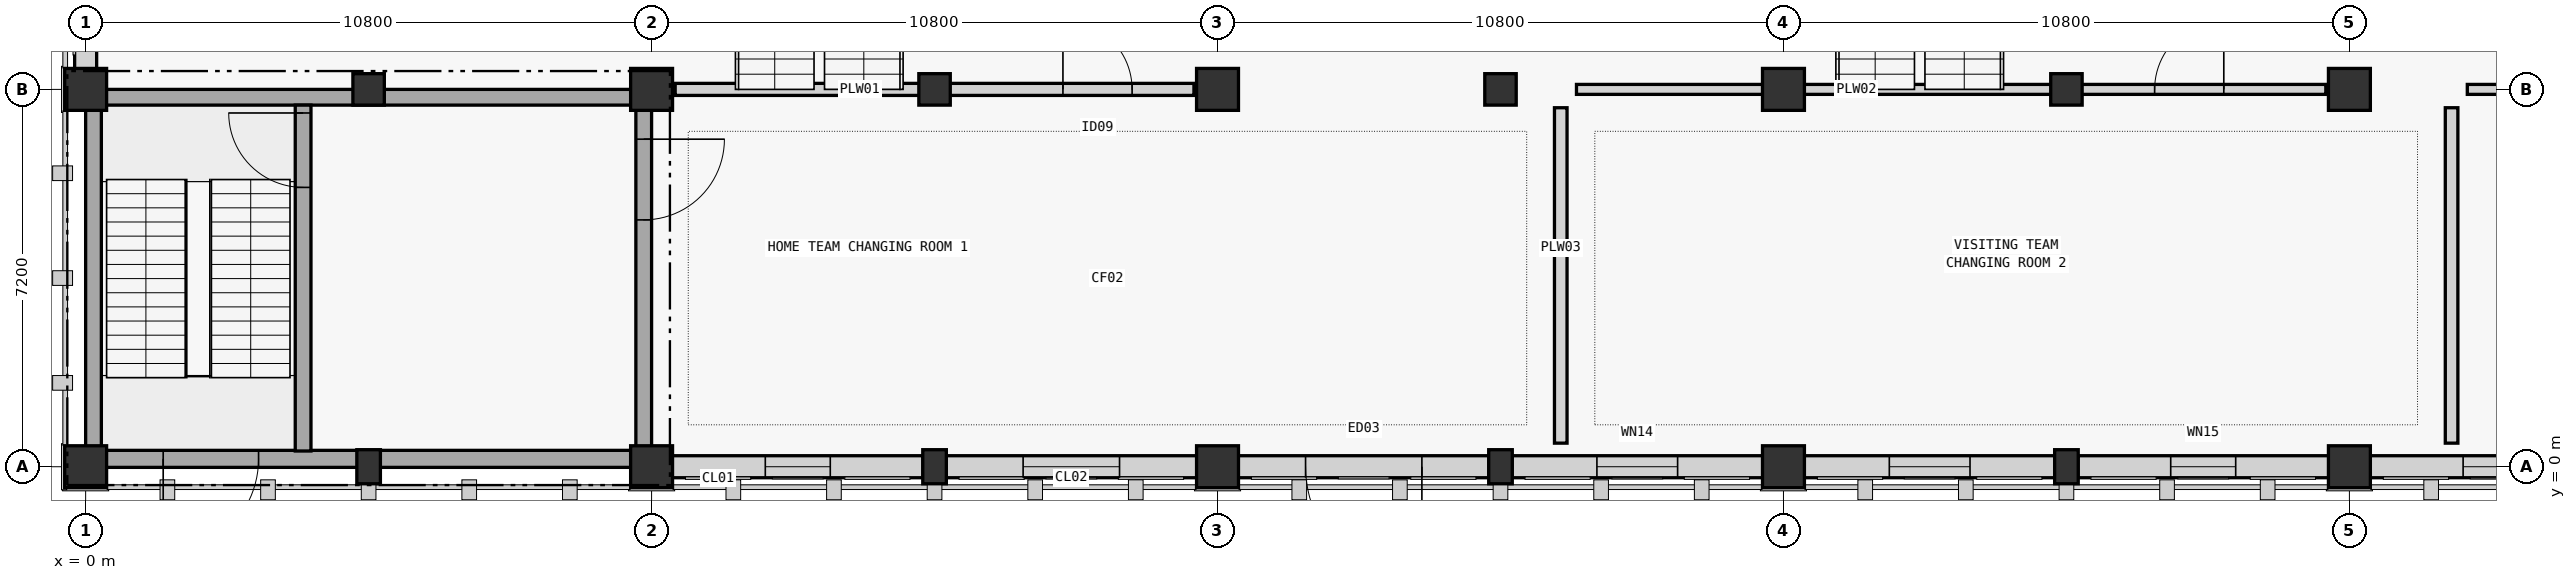
"""IFC4 building model, lengths in metres.
Left out: names, types, materials, properties, quantities, classifications, styles, units other than length and angle.
Written with IfcOpenShell. Run it as: python <this file> out.ifc"""

import sys

from ifc_helpers import new_model, si_unit, direction, frame, frame_2d, origin, origin_2d, place, context, subcontext, project, spatial, rectangle, extrude, element, fill, save


model = new_model("IFC4")
c1 = context("Model", 3, precision=1e-05, world=origin(), true_north=direction((0.0, 1.0)))
c2 = subcontext(c1, "Body", "Model", "MODEL_VIEW")
j1 = project(units=[si_unit("LENGTHUNIT", "METRE"), si_unit("PLANEANGLEUNIT", "RADIAN")], contexts=[c1])
p1 = place(None, origin())
s1 = spatial("IfcSite", under=j1, at=p1, CompositionType="ELEMENT")
p2 = place(p1, origin())
s2 = spatial("IfcBuilding", under=s1, at=p2, CompositionType="ELEMENT")
p3 = place(p2, origin())
s3 = spatial("IfcBuildingStorey", under=s2, at=p3, CompositionType="ELEMENT", Elevation=0.0)
for number, where, z_axis, x_axis in (
    (1, (0.0, 0.0, -0.3), (0.0, 0.0, 1.0), (1.0, 0.0, 0.0)),
    (2, (0.0, 7.2, -0.3), (0.0, 0.0, 1.0), (1.0, 0.0, 0.0)),
    (3, (10.8, 0.0, -0.3), (0.0, 0.0, 1.0), (1.0, 0.0, 0.0)),
    (4, (10.8, 7.2, -0.3), (0.0, 0.0, 1.0), (1.0, 0.0, 0.0)),
    (5, (21.6, 0.0, -0.3), (0.0, 0.0, 1.0), (1.0, 0.0, 0.0)),
    (6, (21.6, 7.2, -0.3), (0.0, 0.0, 1.0), (1.0, 0.0, 0.0)),
    (7, (32.4, 0.0, -0.3), (0.0, 0.0, 1.0), (1.0, 0.0, 0.0)),
    (8, (32.4, 7.2, -0.3), (0.0, 0.0, 1.0), (1.0, 0.0, 0.0)),
    (9, (43.2, 0.0, -0.3), (0.0, 0.0, 1.0), (1.0, 0.0, 0.0)),
    (10, (43.2, 7.2, -0.3), (0.0, 0.0, 1.0), (1.0, 0.0, 0.0)),
):
    element("IfcColumn", number, at=place(p3, frame(where, z_axis=z_axis, x_axis=x_axis)), inside=s3, PredefinedType="COLUMN", context=c2, shape_type="SweptSolid", body=[
        extrude(rectangle(XDim=0.8, YDim=0.8, at=origin_2d()), origin(), (0.0, 0.0, 1.0), 5.7),
    ])
for number, where, z_axis, x_axis in (
    (11, (16.2, 0.0, -0.3), (0.0, 0.0, 1.0), (1.0, 0.0, 0.0)),
    (12, (27.0, 0.0, -0.3), (0.0, 0.0, 1.0), (1.0, 0.0, 0.0)),
    (13, (37.8, 0.0, -0.3), (0.0, 0.0, 1.0), (1.0, 0.0, 0.0)),
    (14, (5.4, 0.0, -0.3), (0.0, 0.0, 1.0), (1.0, 0.0, 0.0)),
):
    element("IfcColumn", number, at=place(p3, frame(where, z_axis=z_axis, x_axis=x_axis)), inside=s3, PredefinedType="PILASTER", context=c2, shape_type="SweptSolid", body=[
        extrude(rectangle(XDim=0.45, YDim=0.65, at=origin_2d()), origin(), (0.0, 0.0, 1.0), 5.7),
    ])
for number, where, z_axis, x_axis in (
    (15, (5.4, 7.2, -0.3), (0.0, 0.0, 1.0), (1.0, 0.0, 0.0)),
    (16, (16.2, 7.2, -0.3), (0.0, 0.0, 1.0), (1.0, 0.0, 0.0)),
    (17, (27.0, 7.2, -0.3), (0.0, 0.0, 1.0), (1.0, 0.0, 0.0)),
    (18, (37.8, 7.2, -0.3), (0.0, 0.0, 1.0), (1.0, 0.0, 0.0)),
):
    element("IfcColumn", number, at=place(p3, frame(where, z_axis=z_axis, x_axis=x_axis)), inside=s3, PredefinedType="COLUMN", context=c2, shape_type="SweptSolid", body=[
        extrude(rectangle(XDim=0.6, YDim=0.6, at=origin_2d()), origin(), (0.0, 0.0, 1.0), 5.7),
    ])
p4 = place(p3, frame((10.8, 0.15, 0.0), z_axis=(0.0, 0.0, 1.0), x_axis=(-1.0, 0.0, 0.0)))
e19 = element("IfcWall", 19, at=p4, inside=s3, PredefinedType="SHEAR", context=c2, shape_type="SweptSolid", body=[
    extrude(rectangle(XDim=10.8, YDim=0.325, at=frame_2d((5.4, 0.0))), origin(), (0.0, 0.0, 1.0), 5.4),
])
p5 = place(p4, frame((7.5, 0.0, 0.0)))
e20 = element("IfcOpeningElement", 20, at=p5, cuts=e19, PredefinedType="OPENING", context=c2, shape_type="SweptSolid", body=[
    extrude(rectangle(XDim=1.82, YDim=2.22, at=frame_2d((0.91, 1.11))), frame((0.0, 0.163, 0.0), z_axis=(0.0, -1.0, 0.0), x_axis=(1.0, 0.0, 0.0)), (0.0, 0.0, 1.0), 0.325),
])
p6 = place(p3, frame((0.0, 7.05, 0.0), z_axis=(0.0, 0.0, 1.0), x_axis=(1.0, 0.0, 0.0)))
e21 = element("IfcWall", 21, at=p6, inside=s3, PredefinedType="SHEAR", context=c2, shape_type="SweptSolid", body=[
    extrude(rectangle(XDim=10.8, YDim=0.3, at=frame_2d((5.4, 0.0))), origin(), (0.0, 0.0, 1.0), 5.4),
])
p7 = place(p3, frame((0.15, 0.3, 0.0), z_axis=(0.0, 0.0, 1.0), x_axis=(0.0, 1.0, 0.0)))
e22 = element("IfcWall", 22, at=p7, inside=s3, PredefinedType="SHEAR", context=c2, shape_type="SweptSolid", body=[
    extrude(rectangle(XDim=6.6, YDim=0.3, at=frame_2d((3.3, 0.0))), origin(), (0.0, 0.0, 1.0), 5.4),
])
p8 = place(p3, frame((10.65, 6.9, 0.0), z_axis=(0.0, 0.0, 1.0), x_axis=(0.0, -1.0, 0.0)))
e23 = element("IfcWall", 23, at=p8, inside=s3, PredefinedType="SHEAR", context=c2, shape_type="SweptSolid", body=[
    extrude(rectangle(XDim=6.6, YDim=0.3, at=frame_2d((3.3, 0.0))), origin(), (0.0, 0.0, 1.0), 5.4),
])
p9 = place(p8, frame((0.65, 0.0, 0.0)))
e24 = element("IfcOpeningElement", 24, at=p9, cuts=e23, PredefinedType="OPENING", context=c2, shape_type="SweptSolid", body=[
    extrude(rectangle(XDim=1.54, YDim=2.22, at=frame_2d((0.77, 1.11))), frame((0.0, 0.15, 0.0), z_axis=(0.0, -1.0, 0.0), x_axis=(1.0, 0.0, 0.0)), (0.0, 0.0, 1.0), 0.3),
])
p10 = place(p3, frame((4.15, 0.3, 0.0), z_axis=(0.0, 0.0, 1.0), x_axis=(0.0, 1.0, 0.0)))
e25 = element("IfcWall", 25, at=p10, inside=s3, PredefinedType="SHEAR", context=c2, shape_type="SweptSolid", body=[
    extrude(rectangle(XDim=6.6, YDim=0.3, at=frame_2d((3.3, 0.0))), origin(), (0.0, 0.0, 1.0), 5.4),
])
p11 = place(p10, frame((5.03, 0.0, 0.0)))
e26 = element("IfcOpeningElement", 26, at=p11, cuts=e25, PredefinedType="OPENING", context=c2, shape_type="SweptSolid", body=[
    extrude(rectangle(XDim=1.42, YDim=2.2, at=frame_2d((0.71, 1.1))), frame((0.0, 0.15, 0.0), z_axis=(0.0, -1.0, 0.0), x_axis=(1.0, 0.0, 0.0)), (0.0, 0.0, 1.0), 0.3),
])
p12 = place(p3, frame((15.979, 0.0, 0.0), z_axis=(0.0, 0.0, 1.0), x_axis=(-1.0, 0.0, 0.0)))
e27 = element("IfcWall", 27, at=p12, inside=s3, PredefinedType="STANDARD", context=c2, shape_type="SweptSolid", body=[
    extrude(rectangle(XDim=4.783, YDim=0.42, at=frame_2d((2.392, 0.0))), origin(), (0.0, 0.0, 1.0), 4.405),
])
p13 = place(p12, frame((1.769, 0.0, 2.15)))
e28 = element("IfcOpeningElement", 28, at=p13, cuts=e27, PredefinedType="OPENING", context=c2, shape_type="SweptSolid", body=[
    extrude(rectangle(XDim=1.24, YDim=0.82, at=frame_2d((0.62, 0.41))), frame((0.0, 0.21, 0.0), z_axis=(0.0, -1.0, 0.0), x_axis=(1.0, 0.0, 0.0)), (0.0, 0.0, 1.0), 0.42),
])
p14 = place(p3, frame((21.204, 0.0, 0.0), z_axis=(0.0, 0.0, 1.0), x_axis=(-1.0, 0.0, 0.0)))
e29 = element("IfcWall", 29, at=p14, inside=s3, PredefinedType="STANDARD", context=c2, shape_type="SweptSolid", body=[
    extrude(rectangle(XDim=4.783, YDim=0.42, at=frame_2d((2.392, 0.0))), origin(), (0.0, 0.0, 1.0), 4.405),
])
p15 = place(p14, frame((1.474, 0.0, 2.15)))
e30 = element("IfcOpeningElement", 30, at=p15, cuts=e29, PredefinedType="OPENING", context=c2, shape_type="SweptSolid", body=[
    extrude(rectangle(XDim=1.84, YDim=0.92, at=frame_2d((0.92, 0.46))), frame((0.0, 0.21, 0.0), z_axis=(0.0, -1.0, 0.0), x_axis=(1.0, 0.0, 0.0)), (0.0, 0.0, 1.0), 0.42),
])
p16 = place(p3, frame((26.779, 0.0, 0.0), z_axis=(0.0, 0.0, 1.0), x_axis=(-1.0, 0.0, 0.0)))
e31 = element("IfcWall", 31, at=p16, inside=s3, PredefinedType="STANDARD", context=c2, shape_type="SweptSolid", body=[
    extrude(rectangle(XDim=4.783, YDim=0.42, at=frame_2d((2.392, 0.0))), origin(), (0.0, 0.0, 1.0), 4.405),
])
p17 = place(p16, frame((1.279, 0.0, 0.0)))
e32 = element("IfcOpeningElement", 32, at=p17, cuts=e31, PredefinedType="OPENING", context=c2, shape_type="SweptSolid", body=[
    extrude(rectangle(XDim=2.22, YDim=2.42, at=frame_2d((1.11, 1.21))), frame((0.0, 0.21, 0.0), z_axis=(0.0, -1.0, 0.0), x_axis=(1.0, 0.0, 0.0)), (0.0, 0.0, 1.0), 0.42),
])
p18 = place(p3, frame((32.004, 0.0, 0.0), z_axis=(0.0, 0.0, 1.0), x_axis=(-1.0, 0.0, 0.0)))
e33 = element("IfcWall", 33, at=p18, inside=s3, PredefinedType="STANDARD", context=c2, shape_type="SweptSolid", body=[
    extrude(rectangle(XDim=4.783, YDim=0.42, at=frame_2d((2.392, 0.0))), origin(), (0.0, 0.0, 1.0), 4.405),
])
p19 = place(p18, frame((1.624, 0.0, 2.15)))
e34 = element("IfcOpeningElement", 34, at=p19, cuts=e33, PredefinedType="OPENING", context=c2, shape_type="SweptSolid", body=[
    extrude(rectangle(XDim=1.54, YDim=0.86, at=frame_2d((0.77, 0.43))), frame((0.0, 0.21, 0.0), z_axis=(0.0, -1.0, 0.0), x_axis=(1.0, 0.0, 0.0)), (0.0, 0.0, 1.0), 0.42),
])
p20 = place(p3, frame((37.579, 0.0, 0.0), z_axis=(0.0, 0.0, 1.0), x_axis=(-1.0, 0.0, 0.0)))
e35 = element("IfcWall", 35, at=p20, inside=s3, PredefinedType="STANDARD", context=c2, shape_type="SweptSolid", body=[
    extrude(rectangle(XDim=4.783, YDim=0.42, at=frame_2d((2.392, 0.0))), origin(), (0.0, 0.0, 1.0), 4.405),
])
p21 = place(p20, frame((1.619, 0.0, 2.15)))
e36 = element("IfcOpeningElement", 36, at=p21, cuts=e35, PredefinedType="OPENING", context=c2, shape_type="SweptSolid", body=[
    extrude(rectangle(XDim=1.54, YDim=0.86, at=frame_2d((0.77, 0.43))), frame((0.0, 0.21, 0.0), z_axis=(0.0, -1.0, 0.0), x_axis=(1.0, 0.0, 0.0)), (0.0, 0.0, 1.0), 0.42),
])
p22 = place(p3, frame((42.804, 0.0, 0.0), z_axis=(0.0, 0.0, 1.0), x_axis=(-1.0, 0.0, 0.0)))
e37 = element("IfcWall", 37, at=p22, inside=s3, PredefinedType="STANDARD", context=c2, shape_type="SweptSolid", body=[
    extrude(rectangle(XDim=4.783, YDim=0.42, at=frame_2d((2.392, 0.0))), origin(), (0.0, 0.0, 1.0), 4.405),
])
p23 = place(p22, frame((1.774, 0.0, 2.15)))
e38 = element("IfcOpeningElement", 38, at=p23, cuts=e37, PredefinedType="OPENING", context=c2, shape_type="SweptSolid", body=[
    extrude(rectangle(XDim=1.24, YDim=0.82, at=frame_2d((0.62, 0.41))), frame((0.0, 0.21, 0.0), z_axis=(0.0, -1.0, 0.0), x_axis=(1.0, 0.0, 0.0)), (0.0, 0.0, 1.0), 0.42),
])
p24 = place(p3, frame((48.379, 0.0, 0.0), z_axis=(0.0, 0.0, 1.0), x_axis=(-1.0, 0.0, 0.0)))
e39 = element("IfcWall", 39, at=p24, inside=s3, PredefinedType="STANDARD", context=c2, shape_type="SweptSolid", body=[
    extrude(rectangle(XDim=4.783, YDim=0.42, at=frame_2d((2.392, 0.0))), origin(), (0.0, 0.0, 1.0), 4.405),
])
p25 = place(p24, frame((1.769, 0.0, 2.15)))
e40 = element("IfcOpeningElement", 40, at=p25, cuts=e39, PredefinedType="OPENING", context=c2, shape_type="SweptSolid", body=[
    extrude(rectangle(XDim=1.24, YDim=0.82, at=frame_2d((0.62, 0.41))), frame((0.0, 0.21, 0.0), z_axis=(0.0, -1.0, 0.0), x_axis=(1.0, 0.0, 0.0)), (0.0, 0.0, 1.0), 0.42),
])
p26 = place(p3, frame((0.0, 7.596, 0.0), z_axis=(0.0, 0.0, 1.0), x_axis=(0.0, 1.0, 0.0)))
e41 = element("IfcWall", 41, at=p26, inside=s3, PredefinedType="STANDARD", context=c2, shape_type="SweptSolid", body=[
    extrude(rectangle(XDim=10.008, YDim=0.42, at=frame_2d((5.004, 0.0))), origin(), (0.0, 0.0, 1.0), 4.7),
])
p27 = place(p26, frame((3.779, 0.0, 0.8)))
e42 = element("IfcOpeningElement", 42, at=p27, cuts=e41, PredefinedType="OPENING", context=c2, shape_type="SweptSolid", body=[
    extrude(rectangle(XDim=2.45, YDim=3.25, at=frame_2d((1.225, 1.625))), frame((0.0, 0.21, 0.0), z_axis=(0.0, -1.0, 0.0), x_axis=(1.0, 0.0, 0.0)), (0.0, 0.0, 1.0), 0.42),
])
p28 = place(p3, frame((11.25, 7.2, 0.0), z_axis=(0.0, 0.0, 1.0), x_axis=(1.0, 0.0, 0.0)))
e43 = element("IfcWall", 43, at=p28, inside=s3, PredefinedType="PLUMBINGWALL", context=c2, shape_type="SweptSolid", body=[
    extrude(rectangle(XDim=9.9, YDim=0.23, at=frame_2d((4.95, 0.0))), origin(), (0.0, 0.0, 1.0), 4.2),
])
p29 = place(p28, frame((7.4, 0.0, 0.0)))
e44 = element("IfcOpeningElement", 44, at=p29, cuts=e43, PredefinedType="OPENING", context=c2, shape_type="SweptSolid", body=[
    extrude(rectangle(XDim=1.32, YDim=2.16, at=frame_2d((0.66, 1.08))), frame((0.0, 0.115, 0.0), z_axis=(0.0, -1.0, 0.0), x_axis=(1.0, 0.0, 0.0)), (0.0, 0.0, 1.0), 0.23),
])
p30 = place(p3, frame((28.45, 7.2, 0.0), z_axis=(0.0, 0.0, 1.0), x_axis=(1.0, 0.0, 0.0)))
e45 = element("IfcWall", 45, at=p30, inside=s3, PredefinedType="PLUMBINGWALL", context=c2, shape_type="SweptSolid", body=[
    extrude(rectangle(XDim=14.3, YDim=0.19, at=frame_2d((7.15, 0.0))), origin(), (0.0, 0.0, 1.0), 4.2),
])
p31 = place(p30, frame((11.033, 0.0, 0.0)))
e46 = element("IfcOpeningElement", 46, at=p31, cuts=e45, PredefinedType="OPENING", context=c2, shape_type="SweptSolid", body=[
    extrude(rectangle(XDim=1.32, YDim=2.16, at=frame_2d((0.66, 1.08))), frame((0.0, 0.095, 0.0), z_axis=(0.0, -1.0, 0.0), x_axis=(1.0, 0.0, 0.0)), (0.0, 0.0, 1.0), 0.19),
])
p32 = place(p3, frame((45.45, 7.2, 0.0), z_axis=(0.0, 0.0, 1.0), x_axis=(1.0, 0.0, 0.0)))
e47 = element("IfcWall", 47, at=p32, inside=s3, PredefinedType="PLUMBINGWALL", context=c2, shape_type="SweptSolid", body=[
    extrude(rectangle(XDim=8.1, YDim=0.19, at=frame_2d((4.05, 0.0))), origin(), (0.0, 0.0, 1.0), 4.2),
])
p33 = place(p32, frame((1.267, 0.0, 0.0)))
e48 = element("IfcOpeningElement", 48, at=p33, cuts=e47, PredefinedType="OPENING", context=c2, shape_type="SweptSolid", body=[
    extrude(rectangle(XDim=1.06, YDim=2.14, at=frame_2d((0.53, 1.07))), frame((0.0, 0.095, 0.0), z_axis=(0.0, -1.0, 0.0), x_axis=(1.0, 0.0, 0.0)), (0.0, 0.0, 1.0), 0.19),
])
for number, where, z_axis, x_axis in (
    (49, (28.15, 0.45, 0.0), (0.0, 0.0, 1.0), (0.0, 1.0, 0.0)),
    (50, (45.15, 0.45, 0.0), (0.0, 0.0, 1.0), (0.0, 1.0, 0.0)),
):
    element("IfcWall", number, at=place(p3, frame(where, z_axis=z_axis, x_axis=x_axis)), inside=s3, PredefinedType="PLUMBINGWALL", context=c2, shape_type="SweptSolid", body=[
        extrude(rectangle(XDim=6.4, YDim=0.24, at=frame_2d((3.2, 0.0))), origin(), (0.0, 0.0, 1.0), 4.2),
    ])
p34 = place(p5, origin())
e51 = element("IfcDoor", 51, at=p34, inside=s3, OperationType="SINGLE_SWING_RIGHT", PredefinedType="DOOR", context=c2, shape_type="SweptSolid", body=[
    extrude(rectangle(XDim=1.82, YDim=2.22, at=frame_2d((0.91, 1.11))), frame((0.0, 0.025, 0.0), z_axis=(0.0, -1.0, 0.0), x_axis=(1.0, 0.0, 0.0)), (0.0, 0.0, 1.0), 0.05),
])
fill(e20, e51)
p35 = place(p13, origin())
e52 = element("IfcWindow", 52, at=p35, inside=s3, PartitioningType="SINGLE_PANEL", PredefinedType="WINDOW", context=c2, shape_type="SweptSolid", body=[
    extrude(rectangle(XDim=1.24, YDim=0.82, at=frame_2d((0.62, 0.41))), frame((0.0, 0.03, 0.0), z_axis=(0.0, -1.0, 0.0), x_axis=(1.0, 0.0, 0.0)), (0.0, 0.0, 1.0), 0.06),
])
fill(e28, e52)
p36 = place(p15, origin())
e53 = element("IfcWindow", 53, at=p36, inside=s3, PartitioningType="SINGLE_PANEL", PredefinedType="WINDOW", context=c2, shape_type="SweptSolid", body=[
    extrude(rectangle(XDim=1.84, YDim=0.92, at=frame_2d((0.92, 0.46))), frame((0.0, 0.03, 0.0), z_axis=(0.0, -1.0, 0.0), x_axis=(1.0, 0.0, 0.0)), (0.0, 0.0, 1.0), 0.06),
])
fill(e30, e53)
p37 = place(p17, origin())
e54 = element("IfcDoor", 54, at=p37, inside=s3, OperationType="SINGLE_SWING_LEFT", PredefinedType="DOOR", context=c2, shape_type="SweptSolid", body=[
    extrude(rectangle(XDim=2.22, YDim=2.42, at=frame_2d((1.11, 1.21))), frame((0.0, 0.025, 0.0), z_axis=(0.0, -1.0, 0.0), x_axis=(1.0, 0.0, 0.0)), (0.0, 0.0, 1.0), 0.05),
])
fill(e32, e54)
p38 = place(p19, origin())
e55 = element("IfcWindow", 55, at=p38, inside=s3, PartitioningType="SINGLE_PANEL", PredefinedType="WINDOW", context=c2, shape_type="SweptSolid", body=[
    extrude(rectangle(XDim=1.54, YDim=0.86, at=frame_2d((0.77, 0.43))), frame((0.0, 0.03, 0.0), z_axis=(0.0, -1.0, 0.0), x_axis=(1.0, 0.0, 0.0)), (0.0, 0.0, 1.0), 0.06),
])
fill(e34, e55)
p39 = place(p21, origin())
e56 = element("IfcWindow", 56, at=p39, inside=s3, PartitioningType="SINGLE_PANEL", PredefinedType="WINDOW", context=c2, shape_type="SweptSolid", body=[
    extrude(rectangle(XDim=1.54, YDim=0.86, at=frame_2d((0.77, 0.43))), frame((0.0, 0.03, 0.0), z_axis=(0.0, -1.0, 0.0), x_axis=(1.0, 0.0, 0.0)), (0.0, 0.0, 1.0), 0.06),
])
fill(e36, e56)
p40 = place(p23, origin())
e57 = element("IfcWindow", 57, at=p40, inside=s3, PartitioningType="SINGLE_PANEL", PredefinedType="WINDOW", context=c2, shape_type="SweptSolid", body=[
    extrude(rectangle(XDim=1.24, YDim=0.82, at=frame_2d((0.62, 0.41))), frame((0.0, 0.03, 0.0), z_axis=(0.0, -1.0, 0.0), x_axis=(1.0, 0.0, 0.0)), (0.0, 0.0, 1.0), 0.06),
])
fill(e38, e57)
p41 = place(p25, origin())
e58 = element("IfcWindow", 58, at=p41, inside=s3, PartitioningType="SINGLE_PANEL", PredefinedType="WINDOW", context=c2, shape_type="SweptSolid", body=[
    extrude(rectangle(XDim=1.24, YDim=0.82, at=frame_2d((0.62, 0.41))), frame((0.0, 0.03, 0.0), z_axis=(0.0, -1.0, 0.0), x_axis=(1.0, 0.0, 0.0)), (0.0, 0.0, 1.0), 0.06),
])
fill(e40, e58)
p42 = place(p11, origin())
e59 = element("IfcDoor", 59, at=p42, inside=s3, OperationType="SINGLE_SWING_RIGHT", PredefinedType="DOOR", context=c2, shape_type="SweptSolid", body=[
    extrude(rectangle(XDim=1.42, YDim=2.2, at=frame_2d((0.71, 1.1))), frame((0.0, 0.025, 0.0), z_axis=(0.0, -1.0, 0.0), x_axis=(1.0, 0.0, 0.0)), (0.0, 0.0, 1.0), 0.05),
])
fill(e26, e59)
p43 = place(p9, origin())
e60 = element("IfcDoor", 60, at=p43, inside=s3, OperationType="SINGLE_SWING_LEFT", PredefinedType="DOOR", context=c2, shape_type="SweptSolid", body=[
    extrude(rectangle(XDim=1.54, YDim=2.22, at=frame_2d((0.77, 1.11))), frame((0.0, 0.025, 0.0), z_axis=(0.0, -1.0, 0.0), x_axis=(1.0, 0.0, 0.0)), (0.0, 0.0, 1.0), 0.05),
])
fill(e24, e60)
p44 = place(p31, origin())
e61 = element("IfcDoor", 61, at=p44, inside=s3, OperationType="SINGLE_SWING_RIGHT", PredefinedType="DOOR", context=c2, shape_type="SweptSolid", body=[
    extrude(rectangle(XDim=1.32, YDim=2.16, at=frame_2d((0.66, 1.08))), frame((0.0, 0.025, 0.0), z_axis=(0.0, -1.0, 0.0), x_axis=(1.0, 0.0, 0.0)), (0.0, 0.0, 1.0), 0.05),
])
fill(e46, e61)
p45 = place(p29, origin())
e62 = element("IfcDoor", 62, at=p45, inside=s3, OperationType="SINGLE_SWING_LEFT", PredefinedType="DOOR", context=c2, shape_type="SweptSolid", body=[
    extrude(rectangle(XDim=1.32, YDim=2.16, at=frame_2d((0.66, 1.08))), frame((0.0, 0.025, 0.0), z_axis=(0.0, -1.0, 0.0), x_axis=(1.0, 0.0, 0.0)), (0.0, 0.0, 1.0), 0.05),
])
fill(e44, e62)
save(model, sys.argv[1])
